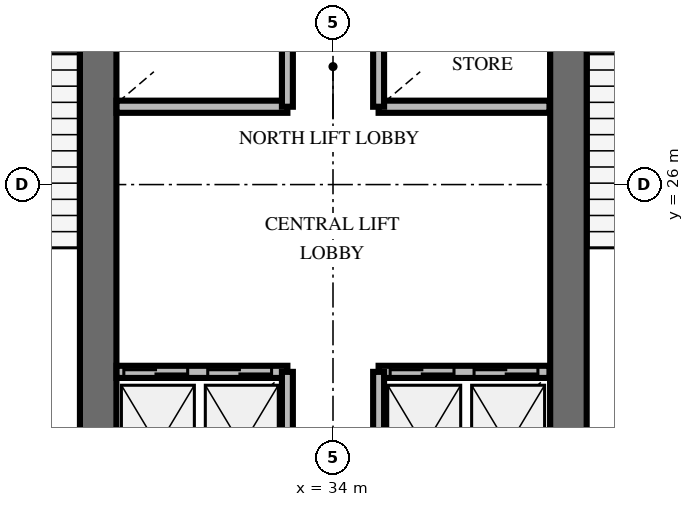
"""IFC4 building model, lengths in metres.
Left out: names, types, materials, properties, quantities, classifications, styles, units other than length and angle.
Written with IfcOpenShell. Run it as: python <this file> out.ifc"""

import sys

from ifc_helpers import new_model, si_unit, direction, frame, frame_2d, origin, place, context, subcontext, project, spatial, rectangle, extrude, element, fill, save


model = new_model("IFC4")
c1 = context("Model", 3, precision=1e-05, world=origin(), true_north=direction((0.0, 1.0)))
c2 = subcontext(c1, "Body", "Model", "MODEL_VIEW")
j1 = project(units=[si_unit("LENGTHUNIT", "METRE"), si_unit("PLANEANGLEUNIT", "RADIAN")], contexts=[c1])
p1 = place(None, origin())
s1 = spatial("IfcSite", under=j1, at=p1, CompositionType="ELEMENT")
p2 = place(p1, origin())
s2 = spatial("IfcBuilding", under=s1, at=p2, CompositionType="ELEMENT")
p3 = place(p2, frame((0.0, 0.0, 101.8)))
s3 = spatial("IfcBuildingStorey", under=s2, at=p3, CompositionType="ELEMENT", Elevation=101.8)
for number, where, z_axis, x_axis in (
    (1, (30.138, 20.187, 0.0), (0.0, 0.0, 1.0), (0.0, 1.0, 0.0)),
    (2, (37.872, 20.187, 0.0), (0.0, 0.0, 1.0), (0.0, 1.0, 0.0)),
):
    element("IfcWall", number, at=place(p3, frame(where, z_axis=z_axis, x_axis=x_axis)), inside=s3, PredefinedType="SHEAR", context=c2, shape_type="SweptSolid", body=[
        extrude(rectangle(XDim=9.826, YDim=0.6, at=frame_2d((4.913, 0.0))), origin(), (0.0, 0.0, 1.0), 4.0),
    ])
p4 = place(p3, frame((30.44, 22.92, 0.0), z_axis=(0.0, 0.0, 1.0), x_axis=(1.0, 0.0, 0.0)))
e3 = element("IfcWall", 3, at=p4, inside=s3, PredefinedType="SOLIDWALL", context=c2, shape_type="SweptSolid", body=[
    extrude(rectangle(XDim=2.81, YDim=0.2, at=frame_2d((1.405, 0.0))), origin(), (0.0, 0.0, 1.0), 2.8),
])
p5 = place(p4, frame((0.12, 0.0, 0.0)))
e4 = element("IfcOpeningElement", 4, at=p5, cuts=e3, PredefinedType="OPENING", context=c2, shape_type="SweptSolid", body=[
    extrude(rectangle(XDim=1.05, YDim=2.1, at=frame_2d((0.525, 1.05))), frame((0.0, 0.11, 0.0), z_axis=(0.0, -1.0, 0.0), x_axis=(1.0, 0.0, 0.0)), (0.0, 0.0, 1.0), 0.22),
])
p6 = place(p4, frame((1.5, 0.0, 0.0)))
e5 = element("IfcOpeningElement", 5, at=p6, cuts=e3, PredefinedType="OPENING", context=c2, shape_type="SweptSolid", body=[
    extrude(rectangle(XDim=1.05, YDim=2.1, at=frame_2d((0.525, 1.05))), frame((0.0, 0.11, 0.0), z_axis=(0.0, -1.0, 0.0), x_axis=(1.0, 0.0, 0.0)), (0.0, 0.0, 1.0), 0.22),
])
p7 = place(p3, frame((33.25, 20.5, 0.0), z_axis=(0.0, 0.0, 1.0), x_axis=(0.0, 1.0, 0.0)))
e6 = element("IfcWall", 6, at=p7, inside=s3, PredefinedType="SOLIDWALL", context=c2, shape_type="SweptSolid", body=[
    extrude(rectangle(XDim=2.42, YDim=0.18, at=frame_2d((1.21, 0.0))), origin(), (0.0, 0.0, 1.0), 2.8),
])
p8 = place(p3, frame((34.75, 22.92, 0.0), z_axis=(0.0, 0.0, 1.0), x_axis=(1.0, 0.0, 0.0)))
e7 = element("IfcWall", 7, at=p8, inside=s3, PredefinedType="SOLIDWALL", context=c2, shape_type="SweptSolid", body=[
    extrude(rectangle(XDim=2.81, YDim=0.2, at=frame_2d((1.405, 0.0))), origin(), (0.0, 0.0, 1.0), 2.8),
])
p9 = place(p8, frame((0.19, 0.0, 0.0)))
e8 = element("IfcOpeningElement", 8, at=p9, cuts=e7, PredefinedType="OPENING", context=c2, shape_type="SweptSolid", body=[
    extrude(rectangle(XDim=1.05, YDim=2.1, at=frame_2d((0.525, 1.05))), frame((0.0, 0.11, 0.0), z_axis=(0.0, -1.0, 0.0), x_axis=(1.0, 0.0, 0.0)), (0.0, 0.0, 1.0), 0.22),
])
p10 = place(p8, frame((1.57, 0.0, 0.0)))
e9 = element("IfcOpeningElement", 9, at=p10, cuts=e7, PredefinedType="OPENING", context=c2, shape_type="SweptSolid", body=[
    extrude(rectangle(XDim=1.05, YDim=2.1, at=frame_2d((0.525, 1.05))), frame((0.0, 0.11, 0.0), z_axis=(0.0, -1.0, 0.0), x_axis=(1.0, 0.0, 0.0)), (0.0, 0.0, 1.0), 0.22),
])
p11 = place(p3, frame((34.75, 20.5, 0.0), z_axis=(0.0, 0.0, 1.0), x_axis=(0.0, 1.0, 0.0)))
e10 = element("IfcWall", 10, at=p11, inside=s3, PredefinedType="SOLIDWALL", context=c2, shape_type="SweptSolid", body=[
    extrude(rectangle(XDim=2.42, YDim=0.18, at=frame_2d((1.21, 0.0))), origin(), (0.0, 0.0, 1.0), 2.8),
])
p12 = place(p3, frame((30.44, 27.28, 0.0), z_axis=(0.0, 0.0, 1.0), x_axis=(1.0, 0.0, 0.0)))
e11 = element("IfcWall", 11, at=p12, inside=s3, PredefinedType="SOLIDWALL", context=c2, shape_type="SweptSolid", body=[
    extrude(rectangle(XDim=2.81, YDim=0.2, at=frame_2d((1.405, 0.0))), origin(), (0.0, 0.0, 1.0), 2.8),
])
p13 = place(p3, frame((33.25, 27.28, 0.0), z_axis=(0.0, 0.0, 1.0), x_axis=(0.0, 1.0, 0.0)))
e12 = element("IfcWall", 12, at=p13, inside=s3, PredefinedType="SOLIDWALL", context=c2, shape_type="SweptSolid", body=[
    extrude(rectangle(XDim=2.47, YDim=0.18, at=frame_2d((1.235, 0.0))), origin(), (0.0, 0.0, 1.0), 2.8),
])
p14 = place(p3, frame((34.75, 27.28, 0.0), z_axis=(0.0, 0.0, 1.0), x_axis=(1.0, 0.0, 0.0)))
e13 = element("IfcWall", 13, at=p14, inside=s3, PredefinedType="SOLIDWALL", context=c2, shape_type="SweptSolid", body=[
    extrude(rectangle(XDim=2.81, YDim=0.2, at=frame_2d((1.405, 0.0))), origin(), (0.0, 0.0, 1.0), 2.8),
])
p15 = place(p3, frame((34.75, 27.28, 0.0), z_axis=(0.0, 0.0, 1.0), x_axis=(0.0, 1.0, 0.0)))
e14 = element("IfcWall", 14, at=p15, inside=s3, PredefinedType="SOLIDWALL", context=c2, shape_type="SweptSolid", body=[
    extrude(rectangle(XDim=2.47, YDim=0.18, at=frame_2d((1.235, 0.0))), origin(), (0.0, 0.0, 1.0), 2.8),
])
p16 = place(p5, origin())
e15 = element("IfcDoor", 15, at=p16, inside=s3, OperationType="DOUBLE_DOOR_SLIDING", PredefinedType="USERDEFINED", context=c2, shape_type="SweptSolid", body=[
    extrude(rectangle(XDim=1.05, YDim=2.1, at=frame_2d((0.525, 1.05))), frame((0.0, 0.025, 0.0), z_axis=(0.0, -1.0, 0.0), x_axis=(1.0, 0.0, 0.0)), (0.0, 0.0, 1.0), 0.05),
])
fill(e4, e15)
p17 = place(p6, origin())
e16 = element("IfcDoor", 16, at=p17, inside=s3, OperationType="DOUBLE_DOOR_SLIDING", PredefinedType="USERDEFINED", context=c2, shape_type="SweptSolid", body=[
    extrude(rectangle(XDim=1.05, YDim=2.1, at=frame_2d((0.525, 1.05))), frame((0.0, 0.025, 0.0), z_axis=(0.0, -1.0, 0.0), x_axis=(1.0, 0.0, 0.0)), (0.0, 0.0, 1.0), 0.05),
])
fill(e5, e16)
p18 = place(p9, origin())
e17 = element("IfcDoor", 17, at=p18, inside=s3, OperationType="DOUBLE_DOOR_SLIDING", PredefinedType="USERDEFINED", context=c2, shape_type="SweptSolid", body=[
    extrude(rectangle(XDim=1.05, YDim=2.1, at=frame_2d((0.525, 1.05))), frame((0.0, 0.025, 0.0), z_axis=(0.0, -1.0, 0.0), x_axis=(1.0, 0.0, 0.0)), (0.0, 0.0, 1.0), 0.05),
])
fill(e8, e17)
p19 = place(p10, origin())
e18 = element("IfcDoor", 18, at=p19, inside=s3, OperationType="DOUBLE_DOOR_SLIDING", PredefinedType="USERDEFINED", context=c2, shape_type="SweptSolid", body=[
    extrude(rectangle(XDim=1.05, YDim=2.1, at=frame_2d((0.525, 1.05))), frame((0.0, 0.025, 0.0), z_axis=(0.0, -1.0, 0.0), x_axis=(1.0, 0.0, 0.0)), (0.0, 0.0, 1.0), 0.05),
])
fill(e9, e18)
save(model, sys.argv[1])
